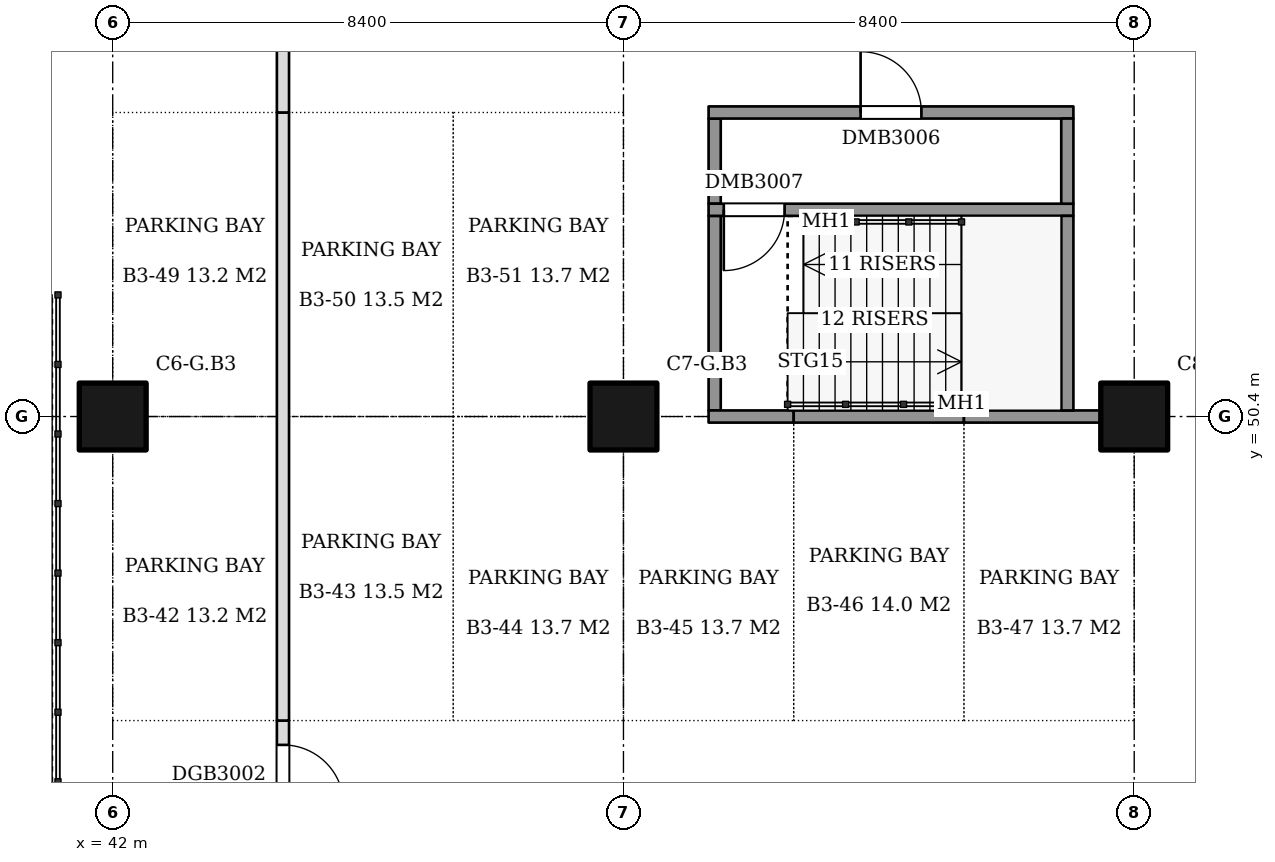
"""IFC4 building model, lengths in metres.
Left out: names, types, materials, properties, quantities, classifications, styles, units other than length and angle.
Written with IfcOpenShell. Run it as: python <this file> out.ifc"""

import sys

from ifc_helpers import new_model, si_unit, direction, frame, frame_2d, origin, origin_2d, place, context, subcontext, project, spatial, rectangle, extrude, element, fill, save


model = new_model("IFC4")
c1 = context("Model", 3, precision=1e-05, world=origin(), true_north=direction((0.0, 1.0)))
c2 = subcontext(c1, "Body", "Model", "MODEL_VIEW")
j1 = project(units=[si_unit("LENGTHUNIT", "METRE"), si_unit("PLANEANGLEUNIT", "RADIAN")], contexts=[c1])
p1 = place(None, origin())
s1 = spatial("IfcSite", under=j1, at=p1, CompositionType="ELEMENT")
p2 = place(p1, origin())
s2 = spatial("IfcBuilding", under=s1, at=p2, CompositionType="ELEMENT")
p3 = place(p2, frame((0.0, 0.0, -12.0)))
s3 = spatial("IfcBuildingStorey", under=s2, at=p3, CompositionType="ELEMENT", Elevation=-12.0)
for number, where, z_axis, x_axis in (
    (1, (42.0, 50.4, 0.0), (0.0, 0.0, 1.0), (1.0, 0.0, 0.0)),
    (2, (50.4, 50.4, 0.0), (0.0, 0.0, 1.0), (1.0, 0.0, 0.0)),
    (3, (58.8, 50.4, 0.0), (0.0, 0.0, 1.0), (1.0, 0.0, 0.0)),
):
    element("IfcColumn", number, at=place(p3, frame(where, z_axis=z_axis, x_axis=x_axis)), inside=s3, PredefinedType="COLUMN", context=c2, shape_type="SweptSolid", body=[
        extrude(rectangle(XDim=1.1, YDim=1.1, at=origin_2d()), origin(), (0.0, 0.0, 1.0), 3.7),
    ])
p4 = place(p3, frame((51.9, 50.5, 0.0), z_axis=(0.0, 0.0, 1.0), x_axis=(0.0, 1.0, 0.0)))
e4 = element("IfcWall", 4, at=p4, inside=s3, PredefinedType="SOLIDWALL", context=c2, shape_type="SweptSolid", body=[
    extrude(rectangle(XDim=3.2, YDim=0.2, at=frame_2d((1.6, 0.0))), origin(), (0.0, 0.0, 1.0), 3.7),
])
p5 = place(p3, frame((51.8, 50.4, 0.0), z_axis=(0.0, 0.0, 1.0), x_axis=(1.0, 0.0, 0.0)))
e5 = element("IfcWall", 5, at=p5, inside=s3, PredefinedType="SOLIDWALL", context=c2, shape_type="SweptSolid", body=[
    extrude(rectangle(XDim=1.4, YDim=0.2, at=frame_2d((0.7, 0.0))), origin(), (0.0, 0.0, 1.0), 3.7),
])
p6 = place(p3, frame((51.9, 53.9, 0.0), z_axis=(0.0, 0.0, 1.0), x_axis=(0.0, 1.0, 0.0)))
e6 = element("IfcWall", 6, at=p6, inside=s3, PredefinedType="SOLIDWALL", context=c2, shape_type="SweptSolid", body=[
    extrude(rectangle(XDim=1.4, YDim=0.2, at=frame_2d((0.7, 0.0))), origin(), (0.0, 0.0, 1.0), 3.7),
])
p7 = place(p3, frame((51.8, 53.8, 0.0), z_axis=(0.0, 0.0, 1.0), x_axis=(1.0, 0.0, 0.0)))
e7 = element("IfcWall", 7, at=p7, inside=s3, PredefinedType="SOLIDWALL", context=c2, shape_type="SweptSolid", body=[
    extrude(rectangle(XDim=6.0, YDim=0.2, at=frame_2d((3.0, 0.0))), origin(), (0.0, 0.0, 1.0), 3.7),
])
p8 = place(p7, frame((0.25, 0.0, 0.0)))
e8 = element("IfcOpeningElement", 8, at=p8, cuts=e7, PredefinedType="OPENING", context=c2, shape_type="SweptSolid", body=[
    extrude(rectangle(XDim=1.0, YDim=2.1, at=frame_2d((0.5, 1.05))), frame((0.0, 0.11, 0.0), z_axis=(0.0, -1.0, 0.0), x_axis=(1.0, 0.0, 0.0)), (0.0, 0.0, 1.0), 0.22),
])
p9 = place(p3, frame((51.8, 55.4, 0.0), z_axis=(0.0, 0.0, 1.0), x_axis=(1.0, 0.0, 0.0)))
e9 = element("IfcWall", 9, at=p9, inside=s3, PredefinedType="SOLIDWALL", context=c2, shape_type="SweptSolid", body=[
    extrude(rectangle(XDim=6.0, YDim=0.2, at=frame_2d((3.0, 0.0))), origin(), (0.0, 0.0, 1.0), 3.7),
])
p10 = place(p9, frame((2.5, 0.0, 0.0)))
e10 = element("IfcOpeningElement", 10, at=p10, cuts=e9, PredefinedType="OPENING", context=c2, shape_type="SweptSolid", body=[
    extrude(rectangle(XDim=1.0, YDim=2.1, at=frame_2d((0.5, 1.05))), frame((0.0, 0.11, 0.0), z_axis=(0.0, -1.0, 0.0), x_axis=(1.0, 0.0, 0.0)), (0.0, 0.0, 1.0), 0.22),
])
p11 = place(p3, frame((53.2, 50.4, 0.0), z_axis=(0.0, 0.0, 1.0), x_axis=(1.0, 0.0, 0.0)))
e11 = element("IfcWall", 11, at=p11, inside=s3, PredefinedType="SOLIDWALL", context=c2, shape_type="SweptSolid", body=[
    extrude(rectangle(XDim=2.8, YDim=0.2, at=frame_2d((1.4, 0.0))), origin(), (0.0, 0.0, 1.0), 3.7),
])
p12 = place(p3, frame((56.0, 50.4, 0.0), z_axis=(0.0, 0.0, 1.0), x_axis=(1.0, 0.0, 0.0)))
e12 = element("IfcWall", 12, at=p12, inside=s3, PredefinedType="SOLIDWALL", context=c2, shape_type="SweptSolid", body=[
    extrude(rectangle(XDim=2.25, YDim=0.2, at=frame_2d((1.125, 0.0))), origin(), (0.0, 0.0, 1.0), 3.7),
])
p13 = place(p3, frame((57.7, 50.5, 0.0), z_axis=(0.0, 0.0, 1.0), x_axis=(0.0, 1.0, 0.0)))
e13 = element("IfcWall", 13, at=p13, inside=s3, PredefinedType="SOLIDWALL", context=c2, shape_type="SweptSolid", body=[
    extrude(rectangle(XDim=3.2, YDim=0.2, at=frame_2d((1.6, 0.0))), origin(), (0.0, 0.0, 1.0), 3.7),
])
p14 = place(p3, frame((57.7, 53.9, 0.0), z_axis=(0.0, 0.0, 1.0), x_axis=(0.0, 1.0, 0.0)))
e14 = element("IfcWall", 14, at=p14, inside=s3, PredefinedType="SOLIDWALL", context=c2, shape_type="SweptSolid", body=[
    extrude(rectangle(XDim=1.4, YDim=0.2, at=frame_2d((0.7, 0.0))), origin(), (0.0, 0.0, 1.0), 3.7),
])
p15 = place(p3, frame((44.8, 38.6, 0.0), z_axis=(0.0, 0.0, 1.0), x_axis=(0.0, 1.0, 0.0)))
e15 = element("IfcWall", 15, at=p15, inside=s3, PredefinedType="PARTITIONING", context=c2, shape_type="SweptSolid", body=[
    extrude(rectangle(XDim=6.8, YDim=0.2, at=frame_2d((3.4, 0.0))), origin(), (0.0, 0.0, 1.0), 3.7),
])
p16 = place(p15, frame((0.3, 0.0, 0.0)))
e16 = element("IfcOpeningElement", 16, at=p16, cuts=e15, PredefinedType="OPENING", context=c2, shape_type="SweptSolid", body=[
    extrude(rectangle(XDim=4.8, YDim=2.4, at=frame_2d((2.4, 1.2))), frame((0.0, 0.11, 0.0), z_axis=(0.0, -1.0, 0.0), x_axis=(1.0, 0.0, 0.0)), (0.0, 0.0, 1.0), 0.22),
])
p17 = place(p15, frame((5.4, 0.0, 0.0)))
e17 = element("IfcOpeningElement", 17, at=p17, cuts=e15, PredefinedType="OPENING", context=c2, shape_type="SweptSolid", body=[
    extrude(rectangle(XDim=1.0, YDim=2.1, at=frame_2d((0.5, 1.05))), frame((0.0, 0.11, 0.0), z_axis=(0.0, -1.0, 0.0), x_axis=(1.0, 0.0, 0.0)), (0.0, 0.0, 1.0), 0.22),
])
p18 = place(p3, frame((44.8, 45.4, 0.0), z_axis=(0.0, 0.0, 1.0), x_axis=(0.0, 1.0, 0.0)))
e18 = element("IfcWall", 18, at=p18, inside=s3, PredefinedType="PARTITIONING", context=c2, shape_type="SweptSolid", body=[
    extrude(rectangle(XDim=10.0, YDim=0.2, at=frame_2d((5.0, 0.0))), origin(), (0.0, 0.0, 1.0), 3.7),
])
p19 = place(p3, frame((44.8, 55.4, 0.0), z_axis=(0.0, 0.0, 1.0), x_axis=(0.0, 1.0, 0.0)))
e19 = element("IfcWall", 19, at=p19, inside=s3, PredefinedType="PARTITIONING", context=c2, shape_type="SweptSolid", body=[
    extrude(rectangle(XDim=3.0, YDim=0.2, at=frame_2d((1.5, 0.0))), origin(), (0.0, 0.0, 1.0), 3.7),
])
p20 = place(p10, origin())
e20 = element("IfcDoor", 20, at=p20, inside=s3, OperationType="SINGLE_SWING_LEFT", PredefinedType="DOOR", context=c2, shape_type="SweptSolid", body=[
    extrude(rectangle(XDim=1.0, YDim=2.1, at=frame_2d((0.5, 1.05))), frame((0.0, 0.025, 0.0), z_axis=(0.0, -1.0, 0.0), x_axis=(1.0, 0.0, 0.0)), (0.0, 0.0, 1.0), 0.05),
])
fill(e10, e20)
p21 = place(p8, frame((1.0, 0.0, 0.0), z_axis=(0.0, 0.0, 1.0), x_axis=(-1.0, 0.0, 0.0)))
e21 = element("IfcDoor", 21, at=p21, inside=s3, OperationType="SINGLE_SWING_RIGHT", PredefinedType="DOOR", context=c2, shape_type="SweptSolid", body=[
    extrude(rectangle(XDim=1.0, YDim=2.1, at=frame_2d((0.5, 1.05))), frame((0.0, 0.025, 0.0), z_axis=(0.0, -1.0, 0.0), x_axis=(1.0, 0.0, 0.0)), (0.0, 0.0, 1.0), 0.05),
])
fill(e8, e21)
p22 = place(p17, frame((1.0, 0.0, 0.0), z_axis=(0.0, 0.0, 1.0), x_axis=(-1.0, 0.0, 0.0)))
e22 = element("IfcDoor", 22, at=p22, inside=s3, OperationType="SINGLE_SWING_RIGHT", PredefinedType="DOOR", context=c2, shape_type="SweptSolid", body=[
    extrude(rectangle(XDim=1.0, YDim=2.1, at=frame_2d((0.5, 1.05))), frame((0.0, 0.025, 0.0), z_axis=(0.0, -1.0, 0.0), x_axis=(1.0, 0.0, 0.0)), (0.0, 0.0, 1.0), 0.05),
])
fill(e17, e22)
save(model, sys.argv[1])
